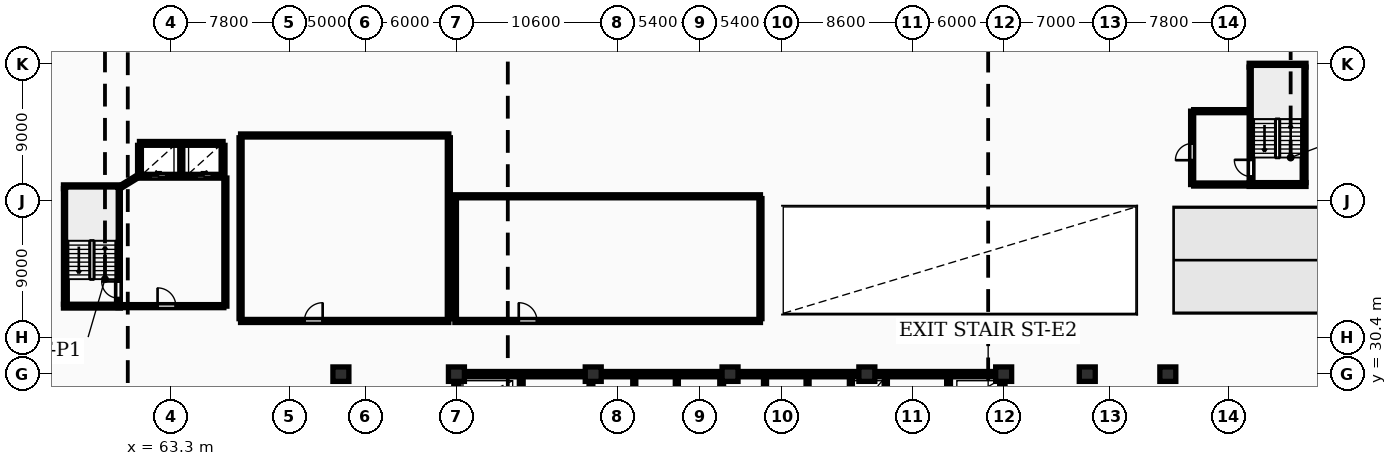
"""IFC4 building model, lengths in metres.
Left out: names, types, materials, properties, quantities, classifications, styles, units other than length and angle.
Written with IfcOpenShell. Run it as: python <this file> out.ifc"""

import sys

from ifc_helpers import new_model, si_unit, direction, frame, frame_2d, origin, origin_2d, place, context, subcontext, project, spatial, rectangle, extrude, element, fill, save


model = new_model("IFC4")
c1 = context("Model", 3, precision=1e-05, world=origin(), true_north=direction((0.0, 1.0)))
c2 = subcontext(c1, "Body", "Model", "MODEL_VIEW")
j1 = project(units=[si_unit("LENGTHUNIT", "METRE"), si_unit("PLANEANGLEUNIT", "RADIAN")], contexts=[c1])
p1 = place(None, origin())
s1 = spatial("IfcSite", under=j1, at=p1, CompositionType="ELEMENT")
p2 = place(p1, origin())
s2 = spatial("IfcBuilding", under=s1, at=p2, CompositionType="ELEMENT")
p3 = place(p2, frame((0.0, 0.0, -3.6)))
s3 = spatial("IfcBuildingStorey", under=s2, at=p3, CompositionType="ELEMENT", Elevation=-3.6)
for number, where, z_axis, x_axis in (
    (1, (74.5, 30.4, 0.0), (0.0, 0.0, 1.0), (1.0, 0.0, 0.0)),
    (2, (82.1, 30.4, 0.0), (0.0, 0.0, 1.0), (1.0, 0.0, 0.0)),
    (3, (91.1, 30.4, 0.0), (0.0, 0.0, 1.0), (1.0, 0.0, 0.0)),
    (4, (100.1, 30.4, 0.0), (0.0, 0.0, 1.0), (1.0, 0.0, 0.0)),
    (5, (109.1, 30.4, 0.0), (0.0, 0.0, 1.0), (1.0, 0.0, 0.0)),
    (6, (118.1, 30.4, 0.0), (0.0, 0.0, 1.0), (1.0, 0.0, 0.0)),
    (7, (123.6, 30.4, 0.0), (0.0, 0.0, 1.0), (1.0, 0.0, 0.0)),
    (8, (128.9, 30.4, 0.0), (0.0, 0.0, 1.0), (1.0, 0.0, 0.0)),
):
    element("IfcColumn", number, at=place(p3, frame(where, z_axis=z_axis, x_axis=x_axis)), inside=s3, PredefinedType="COLUMN", context=c2, shape_type="SweptSolid", body=[
        extrude(rectangle(XDim=1.05, YDim=0.95, at=origin_2d()), origin(), (0.0, 0.0, 1.0), 3.6),
    ])
p4 = place(p3, frame((81.925, 30.4, 0.0), z_axis=(0.0, 0.0, 1.0), x_axis=(1.0, 0.0, 0.0)))
e9 = element("IfcWall", 9, at=p4, inside=s3, PredefinedType="SHEAR", context=c2, shape_type="SweptSolid", body=[
    extrude(rectangle(XDim=36.265, YDim=0.35, at=frame_2d((18.132, 0.0))), origin(), (0.0, 0.0, 1.0), 3.6),
])
for number, where, z_axis, x_axis in (
    (10, (82.1, 18.575, 0.0), (0.0, 0.0, 1.0), (0.0, 1.0, 0.0)),
    (11, (118.015, 18.575, 0.0), (0.0, 0.0, 1.0), (0.0, 1.0, 0.0)),
):
    element("IfcWall", number, at=place(p3, frame(where, z_axis=z_axis, x_axis=x_axis)), inside=s3, PredefinedType="SHEAR", context=c2, shape_type="SweptSolid", body=[
        extrude(rectangle(XDim=11.65, YDim=0.35, at=frame_2d((5.825, 0.0))), origin(), (0.0, 0.0, 1.0), 3.6),
    ])
p5 = place(p3, frame((86.365, 18.6, 0.0), z_axis=(0.0, 0.0, 1.0), x_axis=(0.0, 1.0, 0.0)))
e12 = element("IfcWall", 12, at=p5, inside=s3, PredefinedType="SHEAR", context=c2, shape_type="SweptSolid", body=[
    extrude(rectangle(XDim=11.6, YDim=0.25, at=frame_2d((5.8, 0.0))), origin(), (0.0, 0.0, 1.0), 3.6),
])
p6 = place(p5, frame((0.45, 0.0, 0.0)))
e13 = element("IfcOpeningElement", 13, at=p6, cuts=e12, PredefinedType="OPENING", context=c2, shape_type="SweptSolid", body=[
    extrude(rectangle(XDim=0.85, YDim=2.05, at=frame_2d((0.425, 1.025))), frame((0.0, 0.135, 0.0), z_axis=(0.0, -1.0, 0.0), x_axis=(1.0, 0.0, 0.0)), (0.0, 0.0, 1.0), 0.27),
])
p7 = place(p5, frame((2.05, 0.0, 0.0)))
e14 = element("IfcOpeningElement", 14, at=p7, cuts=e12, PredefinedType="OPENING", context=c2, shape_type="SweptSolid", body=[
    extrude(rectangle(XDim=1.1, YDim=2.1, at=frame_2d((0.55, 1.05))), frame((0.0, 0.135, 0.0), z_axis=(0.0, -1.0, 0.0), x_axis=(1.0, 0.0, 0.0)), (0.0, 0.0, 1.0), 0.27),
])
p8 = place(p5, frame((9.95, 0.0, 0.0)))
e15 = element("IfcOpeningElement", 15, at=p8, cuts=e12, PredefinedType="OPENING", context=c2, shape_type="SweptSolid", body=[
    extrude(rectangle(XDim=0.85, YDim=2.05, at=frame_2d((0.425, 1.025))), frame((0.0, 0.135, 0.0), z_axis=(0.0, -1.0, 0.0), x_axis=(1.0, 0.0, 0.0)), (0.0, 0.0, 1.0), 0.27),
])
p9 = place(p3, frame((90.95, 18.6, 0.0), z_axis=(0.0, 0.0, 1.0), x_axis=(0.0, 1.0, 0.0)))
e16 = element("IfcWall", 16, at=p9, inside=s3, PredefinedType="SHEAR", context=c2, shape_type="SweptSolid", body=[
    extrude(rectangle(XDim=11.6, YDim=0.25, at=frame_2d((5.8, 0.0))), origin(), (0.0, 0.0, 1.0), 3.6),
])
p10 = place(p9, frame((4.6, 0.0, 0.0)))
e17 = element("IfcOpeningElement", 17, at=p10, cuts=e16, PredefinedType="OPENING", context=c2, shape_type="SweptSolid", body=[
    extrude(rectangle(XDim=1.1, YDim=2.1, at=frame_2d((0.55, 1.05))), frame((0.0, 0.135, 0.0), z_axis=(0.0, -1.0, 0.0), x_axis=(1.0, 0.0, 0.0)), (0.0, 0.0, 1.0), 0.27),
])
for number, where, z_axis, x_axis in (
    (18, (93.8, 27.38, 0.0), (0.0, 0.0, 1.0), (0.0, 1.0, 0.0)),
    (19, (96.6, 27.38, 0.0), (0.0, 0.0, 1.0), (0.0, 1.0, 0.0)),
):
    element("IfcWall", number, at=place(p3, frame(where, z_axis=z_axis, x_axis=x_axis)), inside=s3, PredefinedType="PARTITIONING", context=c2, shape_type="SweptSolid", body=[
        extrude(rectangle(XDim=2.82, YDim=0.2, at=frame_2d((1.41, 0.0))), origin(), (0.0, 0.0, 1.0), 3.3),
    ])
p11 = place(p3, frame((99.55, 27.25, 0.0), z_axis=(0.0, 0.0, 1.0), x_axis=(0.0, 1.0, 0.0)))
e20 = element("IfcWall", 20, at=p11, inside=s3, PredefinedType="SHEAR", context=c2, shape_type="SweptSolid", body=[
    extrude(rectangle(XDim=2.95, YDim=0.25, at=frame_2d((1.475, 0.0))), origin(), (0.0, 0.0, 1.0), 3.6),
])
for number, where, z_axis, x_axis in (
    (21, (102.4, 27.38, 0.0), (0.0, 0.0, 1.0), (0.0, 1.0, 0.0)),
    (22, (105.2, 27.38, 0.0), (0.0, 0.0, 1.0), (0.0, 1.0, 0.0)),
    (23, (108.05, 27.38, 0.0), (0.0, 0.0, 1.0), (0.0, 1.0, 0.0)),
):
    element("IfcWall", number, at=place(p3, frame(where, z_axis=z_axis, x_axis=x_axis)), inside=s3, PredefinedType="PARTITIONING", context=c2, shape_type="SweptSolid", body=[
        extrude(rectangle(XDim=2.82, YDim=0.2, at=frame_2d((1.41, 0.0))), origin(), (0.0, 0.0, 1.0), 3.3),
    ])
p12 = place(p3, frame((110.35, 18.6, 0.0), z_axis=(0.0, 0.0, 1.0), x_axis=(0.0, 1.0, 0.0)))
e24 = element("IfcWall", 24, at=p12, inside=s3, PredefinedType="PARTITIONING", context=c2, shape_type="SweptSolid", body=[
    extrude(rectangle(XDim=11.6, YDim=0.2, at=frame_2d((5.8, 0.0))), origin(), (0.0, 0.0, 1.0), 3.3),
])
p13 = place(p12, frame((5.2, 0.0, 0.0)))
e25 = element("IfcOpeningElement", 25, at=p13, cuts=e24, PredefinedType="OPENING", context=c2, shape_type="SweptSolid", body=[
    extrude(rectangle(XDim=1.1, YDim=2.15, at=frame_2d((0.55, 1.075))), frame((0.0, 0.11, 0.0), z_axis=(0.0, -1.0, 0.0), x_axis=(1.0, 0.0, 0.0)), (0.0, 0.0, 1.0), 0.22),
])
p14 = place(p3, frame((114.475, 18.6, 0.0), z_axis=(0.0, 0.0, 1.0), x_axis=(0.0, 1.0, 0.0)))
e26 = element("IfcWall", 26, at=p14, inside=s3, PredefinedType="SHEAR", context=c2, shape_type="SweptSolid", body=[
    extrude(rectangle(XDim=11.6, YDim=0.25, at=frame_2d((5.8, 0.0))), origin(), (0.0, 0.0, 1.0), 3.6),
])
p15 = place(p14, frame((0.45, 0.0, 0.0)))
e27 = element("IfcOpeningElement", 27, at=p15, cuts=e26, PredefinedType="OPENING", context=c2, shape_type="SweptSolid", body=[
    extrude(rectangle(XDim=0.85, YDim=2.05, at=frame_2d((0.425, 1.025))), frame((0.0, 0.135, 0.0), z_axis=(0.0, -1.0, 0.0), x_axis=(1.0, 0.0, 0.0)), (0.0, 0.0, 1.0), 0.27),
])
p16 = place(p14, frame((2.05, 0.0, 0.0)))
e28 = element("IfcOpeningElement", 28, at=p16, cuts=e26, PredefinedType="OPENING", context=c2, shape_type="SweptSolid", body=[
    extrude(rectangle(XDim=1.1, YDim=2.1, at=frame_2d((0.55, 1.05))), frame((0.0, 0.135, 0.0), z_axis=(0.0, -1.0, 0.0), x_axis=(1.0, 0.0, 0.0)), (0.0, 0.0, 1.0), 0.27),
])
p17 = place(p14, frame((9.95, 0.0, 0.0)))
e29 = element("IfcOpeningElement", 29, at=p17, cuts=e26, PredefinedType="OPENING", context=c2, shape_type="SweptSolid", body=[
    extrude(rectangle(XDim=0.85, YDim=2.05, at=frame_2d((0.425, 1.025))), frame((0.0, 0.135, 0.0), z_axis=(0.0, -1.0, 0.0), x_axis=(1.0, 0.0, 0.0)), (0.0, 0.0, 1.0), 0.27),
])
p18 = place(p3, frame((56.375, 35.0, 0.0), z_axis=(0.0, 0.0, 1.0), x_axis=(0.0, 1.0, 0.0)))
e30 = element("IfcWall", 30, at=p18, inside=s3, PredefinedType="SHEAR", context=c2, shape_type="SweptSolid", body=[
    extrude(rectangle(XDim=7.6, YDim=0.25, at=frame_2d((3.8, 0.0))), origin(), (0.0, 0.0, 1.0), 3.6),
])
for number, where, z_axis, x_axis in (
    (31, (56.25, 42.725, 0.0), (0.0, 0.0, 1.0), (1.0, 0.0, 0.0)),
    (32, (56.25, 34.875, 0.0), (0.0, 0.0, 1.0), (1.0, 0.0, 0.0)),
):
    element("IfcWall", number, at=place(p3, frame(where, z_axis=z_axis, x_axis=x_axis)), inside=s3, PredefinedType="SHEAR", context=c2, shape_type="SweptSolid", body=[
        extrude(rectangle(XDim=3.74, YDim=0.25, at=frame_2d((1.87, 0.0))), origin(), (0.0, 0.0, 1.0), 3.6),
    ])
p19 = place(p3, frame((59.865, 35.0, 0.0), z_axis=(0.0, 0.0, 1.0), x_axis=(0.0, 1.0, 0.0)))
e33 = element("IfcWall", 33, at=p19, inside=s3, PredefinedType="SHEAR", context=c2, shape_type="SweptSolid", body=[
    extrude(rectangle(XDim=7.6, YDim=0.25, at=frame_2d((3.8, 0.0))), origin(), (0.0, 0.0, 1.0), 3.6),
])
p20 = place(p19, frame((0.4, 0.0, 0.0)))
e34 = element("IfcOpeningElement", 34, at=p20, cuts=e33, PredefinedType="OPENING", context=c2, shape_type="SweptSolid", body=[
    extrude(rectangle(XDim=1.1, YDim=2.1, at=frame_2d((0.55, 1.05))), frame((0.0, 0.135, 0.0), z_axis=(0.0, -1.0, 0.0), x_axis=(1.0, 0.0, 0.0)), (0.0, 0.0, 1.0), 0.27),
])
p21 = place(p3, frame((61.25, 43.42, 0.0), z_axis=(0.0, 0.0, 1.0), x_axis=(1.0, 0.0, 0.0)))
e35 = element("IfcWall", 35, at=p21, inside=s3, PredefinedType="SHEAR", context=c2, shape_type="SweptSolid", body=[
    extrude(rectangle(XDim=5.5, YDim=0.25, at=frame_2d((2.75, 0.0))), origin(), (0.0, 0.0, 1.0), 3.6),
])
p22 = place(p21, frame((0.74, 0.0, 0.0)))
e36 = element("IfcOpeningElement", 36, at=p22, cuts=e35, PredefinedType="OPENING", context=c2, shape_type="SweptSolid", body=[
    extrude(rectangle(XDim=1.02, YDim=2.12, at=frame_2d((0.51, 1.06))), frame((0.0, 0.135, 0.0), z_axis=(0.0, -1.0, 0.0), x_axis=(1.0, 0.0, 0.0)), (0.0, 0.0, 1.0), 0.27),
])
p23 = place(p21, frame((3.74, 0.0, 0.0)))
e37 = element("IfcOpeningElement", 37, at=p23, cuts=e35, PredefinedType="OPENING", context=c2, shape_type="SweptSolid", body=[
    extrude(rectangle(XDim=1.02, YDim=2.12, at=frame_2d((0.51, 1.06))), frame((0.0, 0.135, 0.0), z_axis=(0.0, -1.0, 0.0), x_axis=(1.0, 0.0, 0.0)), (0.0, 0.0, 1.0), 0.27),
])
p24 = place(p3, frame((61.25, 45.58, 0.0), z_axis=(0.0, 0.0, 1.0), x_axis=(1.0, 0.0, 0.0)))
e38 = element("IfcWall", 38, at=p24, inside=s3, PredefinedType="SHEAR", context=c2, shape_type="SweptSolid", body=[
    extrude(rectangle(XDim=5.5, YDim=0.25, at=frame_2d((2.75, 0.0))), origin(), (0.0, 0.0, 1.0), 3.6),
])
for number, where, z_axis, x_axis in (
    (39, (61.25, 43.55, 0.0), (0.0, 0.0, 1.0), (0.0, 1.0, 0.0)),
    (40, (66.75, 43.55, 0.0), (0.0, 0.0, 1.0), (0.0, 1.0, 0.0)),
):
    element("IfcWall", number, at=place(p3, frame(where, z_axis=z_axis, x_axis=x_axis)), inside=s3, PredefinedType="SHEAR", context=c2, shape_type="SweptSolid", body=[
        extrude(rectangle(XDim=1.9, YDim=0.25, at=frame_2d((0.95, 0.0))), origin(), (0.0, 0.0, 1.0), 3.6),
    ])
p25 = place(p3, frame((64.0, 43.55, 0.0), z_axis=(0.0, 0.0, 1.0), x_axis=(0.0, 1.0, 0.0)))
e41 = element("IfcWall", 41, at=p25, inside=s3, PredefinedType="PARTITIONING", context=c2, shape_type="SweptSolid", body=[
    extrude(rectangle(XDim=1.9, YDim=0.2, at=frame_2d((0.95, 0.0))), origin(), (0.0, 0.0, 1.0), 3.3),
])
p26 = place(p3, frame((59.84, 34.875, 0.0), z_axis=(0.0, 0.0, 1.0), x_axis=(1.0, 0.0, 0.0)))
e42 = element("IfcWall", 42, at=p26, inside=s3, PredefinedType="PARTITIONING", context=c2, shape_type="SweptSolid", body=[
    extrude(rectangle(XDim=6.96, YDim=0.2, at=frame_2d((3.48, 0.0))), origin(), (0.0, 0.0, 1.0), 3.3),
])
p27 = place(p26, frame((2.6, 0.0, 0.0)))
e43 = element("IfcOpeningElement", 43, at=p27, cuts=e42, PredefinedType="OPENING", context=c2, shape_type="SweptSolid", body=[
    extrude(rectangle(XDim=1.2, YDim=2.18, at=frame_2d((0.6, 1.09))), frame((0.0, 0.11, 0.0), z_axis=(0.0, -1.0, 0.0), x_axis=(1.0, 0.0, 0.0)), (0.0, 0.0, 1.0), 0.22),
])
p28 = place(p3, frame((66.9, 34.875, 0.0), z_axis=(0.0, 0.0, 1.0), x_axis=(0.0, 1.0, 0.0)))
e44 = element("IfcWall", 44, at=p28, inside=s3, PredefinedType="PARTITIONING", context=c2, shape_type="SweptSolid", body=[
    extrude(rectangle(XDim=8.425, YDim=0.2, at=frame_2d((4.212, 0.0))), origin(), (0.0, 0.0, 1.0), 3.3),
])
p29 = place(p3, frame((60.02, 42.725, 0.0), z_axis=(0.0, 0.0, 1.0), x_axis=(0.851822584555, 0.523830396638, 0.0)))
e45 = element("IfcWall", 45, at=p29, inside=s3, PredefinedType="PARTITIONING", context=c2, shape_type="SweptSolid", body=[
    extrude(rectangle(XDim=1.326, YDim=0.2, at=frame_2d((0.663, 0.0))), origin(), (0.0, 0.0, 1.0), 3.3),
])
p30 = place(p3, frame((134.375, 43.0, 0.0), z_axis=(0.0, 0.0, 1.0), x_axis=(0.0, 1.0, 0.0)))
e46 = element("IfcWall", 46, at=p30, inside=s3, PredefinedType="SHEAR", context=c2, shape_type="SweptSolid", body=[
    extrude(rectangle(XDim=7.6, YDim=0.25, at=frame_2d((3.8, 0.0))), origin(), (0.0, 0.0, 1.0), 3.6),
])
p31 = place(p30, frame((0.4, 0.0, 0.0)))
e47 = element("IfcOpeningElement", 47, at=p31, cuts=e46, PredefinedType="OPENING", context=c2, shape_type="SweptSolid", body=[
    extrude(rectangle(XDim=1.1, YDim=2.1, at=frame_2d((0.55, 1.05))), frame((0.0, 0.135, 0.0), z_axis=(0.0, -1.0, 0.0), x_axis=(1.0, 0.0, 0.0)), (0.0, 0.0, 1.0), 0.27),
])
p32 = place(p3, frame((137.865, 43.0, 0.0), z_axis=(0.0, 0.0, 1.0), x_axis=(0.0, 1.0, 0.0)))
e48 = element("IfcWall", 48, at=p32, inside=s3, PredefinedType="SHEAR", context=c2, shape_type="SweptSolid", body=[
    extrude(rectangle(XDim=7.6, YDim=0.25, at=frame_2d((3.8, 0.0))), origin(), (0.0, 0.0, 1.0), 3.6),
])
for number, where, z_axis, x_axis in (
    (49, (134.25, 42.875, 0.0), (0.0, 0.0, 1.0), (1.0, 0.0, 0.0)),
    (50, (134.25, 50.725, 0.0), (0.0, 0.0, 1.0), (1.0, 0.0, 0.0)),
):
    element("IfcWall", number, at=place(p3, frame(where, z_axis=z_axis, x_axis=x_axis)), inside=s3, PredefinedType="SHEAR", context=c2, shape_type="SweptSolid", body=[
        extrude(rectangle(XDim=3.74, YDim=0.25, at=frame_2d((1.87, 0.0))), origin(), (0.0, 0.0, 1.0), 3.6),
    ])
p33 = place(p3, frame((130.5, 42.875, 0.0), z_axis=(0.0, 0.0, 1.0), x_axis=(0.0, 1.0, 0.0)))
e51 = element("IfcWall", 51, at=p33, inside=s3, PredefinedType="PARTITIONING", context=c2, shape_type="SweptSolid", body=[
    extrude(rectangle(XDim=4.825, YDim=0.2, at=frame_2d((2.413, 0.0))), origin(), (0.0, 0.0, 1.0), 3.3),
])
p34 = place(p33, frame((1.6, 0.0, 0.0)))
e52 = element("IfcOpeningElement", 52, at=p34, cuts=e51, PredefinedType="OPENING", context=c2, shape_type="SweptSolid", body=[
    extrude(rectangle(XDim=1.1, YDim=2.15, at=frame_2d((0.55, 1.075))), frame((0.0, 0.11, 0.0), z_axis=(0.0, -1.0, 0.0), x_axis=(1.0, 0.0, 0.0)), (0.0, 0.0, 1.0), 0.22),
])
for number, where, z_axis, x_axis in (
    (53, (130.6, 42.875, 0.0), (0.0, 0.0, 1.0), (1.0, 0.0, 0.0)),
    (54, (130.6, 47.7, 0.0), (0.0, 0.0, 1.0), (1.0, 0.0, 0.0)),
):
    element("IfcWall", number, at=place(p3, frame(where, z_axis=z_axis, x_axis=x_axis)), inside=s3, PredefinedType="PARTITIONING", context=c2, shape_type="SweptSolid", body=[
        extrude(rectangle(XDim=3.65, YDim=0.2, at=frame_2d((1.825, 0.0))), origin(), (0.0, 0.0, 1.0), 3.3),
    ])
p35 = place(p3, frame((67.9, 33.9, 0.0), z_axis=(0.0, 0.0, 1.0), x_axis=(1.0, 0.0, 0.0)))
e55 = element("IfcWall", 55, at=p35, inside=s3, PredefinedType="PARTITIONING", context=c2, shape_type="SweptSolid", body=[
    extrude(rectangle(XDim=13.7, YDim=0.2, at=frame_2d((6.85, 0.0))), origin(), (0.0, 0.0, 1.0), 3.3),
])
p36 = place(p35, frame((4.2, 0.0, 0.0)))
e56 = element("IfcOpeningElement", 56, at=p36, cuts=e55, PredefinedType="OPENING", context=c2, shape_type="SweptSolid", body=[
    extrude(rectangle(XDim=1.2, YDim=2.15, at=frame_2d((0.6, 1.075))), frame((0.0, 0.11, 0.0), z_axis=(0.0, -1.0, 0.0), x_axis=(1.0, 0.0, 0.0)), (0.0, 0.0, 1.0), 0.22),
])
p37 = place(p3, frame((67.9, 46.1, 0.0), z_axis=(0.0, 0.0, 1.0), x_axis=(1.0, 0.0, 0.0)))
e57 = element("IfcWall", 57, at=p37, inside=s3, PredefinedType="PARTITIONING", context=c2, shape_type="SweptSolid", body=[
    extrude(rectangle(XDim=13.7, YDim=0.2, at=frame_2d((6.85, 0.0))), origin(), (0.0, 0.0, 1.0), 3.3),
])
for number, where, z_axis, x_axis in (
    (58, (67.9, 34.05, 0.0), (0.0, 0.0, 1.0), (0.0, 1.0, 0.0)),
    (59, (81.6, 34.05, 0.0), (0.0, 0.0, 1.0), (0.0, 1.0, 0.0)),
):
    element("IfcWall", number, at=place(p3, frame(where, z_axis=z_axis, x_axis=x_axis)), inside=s3, PredefinedType="PARTITIONING", context=c2, shape_type="SweptSolid", body=[
        extrude(rectangle(XDim=11.9, YDim=0.2, at=frame_2d((5.95, 0.0))), origin(), (0.0, 0.0, 1.0), 3.3),
    ])
p38 = place(p3, frame((82.0, 33.9, 0.0), z_axis=(0.0, 0.0, 1.0), x_axis=(1.0, 0.0, 0.0)))
e60 = element("IfcWall", 60, at=p38, inside=s3, PredefinedType="PARTITIONING", context=c2, shape_type="SweptSolid", body=[
    extrude(rectangle(XDim=20.1, YDim=0.2, at=frame_2d((10.05, 0.0))), origin(), (0.0, 0.0, 1.0), 3.3),
])
p39 = place(p38, frame((4.2, 0.0, 0.0)))
e61 = element("IfcOpeningElement", 61, at=p39, cuts=e60, PredefinedType="OPENING", context=c2, shape_type="SweptSolid", body=[
    extrude(rectangle(XDim=1.2, YDim=2.15, at=frame_2d((0.6, 1.075))), frame((0.0, 0.11, 0.0), z_axis=(0.0, -1.0, 0.0), x_axis=(1.0, 0.0, 0.0)), (0.0, 0.0, 1.0), 0.22),
])
p40 = place(p3, frame((82.0, 42.1, 0.0), z_axis=(0.0, 0.0, 1.0), x_axis=(1.0, 0.0, 0.0)))
e62 = element("IfcWall", 62, at=p40, inside=s3, PredefinedType="PARTITIONING", context=c2, shape_type="SweptSolid", body=[
    extrude(rectangle(XDim=20.1, YDim=0.2, at=frame_2d((10.05, 0.0))), origin(), (0.0, 0.0, 1.0), 3.3),
])
for number, where, z_axis, x_axis in (
    (63, (82.0, 34.05, 0.0), (0.0, 0.0, 1.0), (0.0, 1.0, 0.0)),
    (64, (102.1, 34.05, 0.0), (0.0, 0.0, 1.0), (0.0, 1.0, 0.0)),
):
    element("IfcWall", number, at=place(p3, frame(where, z_axis=z_axis, x_axis=x_axis)), inside=s3, PredefinedType="PARTITIONING", context=c2, shape_type="SweptSolid", body=[
        extrude(rectangle(XDim=7.9, YDim=0.2, at=frame_2d((3.95, 0.0))), origin(), (0.0, 0.0, 1.0), 3.3),
    ])
p41 = place(p20, origin())
e65 = element("IfcDoor", 65, at=p41, inside=s3, OperationType="SINGLE_SWING_RIGHT", PredefinedType="DOOR", context=c2, shape_type="SweptSolid", body=[
    extrude(rectangle(XDim=1.1, YDim=2.1, at=frame_2d((0.55, 1.05))), frame((0.0, 0.025, 0.0), z_axis=(0.0, -1.0, 0.0), x_axis=(1.0, 0.0, 0.0)), (0.0, 0.0, 1.0), 0.05),
])
fill(e34, e65)
p42 = place(p22, origin())
e66 = element("IfcDoor", 66, at=p42, inside=s3, OperationType="SLIDING_TO_LEFT", PredefinedType="DOOR", context=c2, shape_type="SweptSolid", body=[
    extrude(rectangle(XDim=1.02, YDim=2.12, at=frame_2d((0.51, 1.06))), frame((0.0, 0.025, 0.0), z_axis=(0.0, -1.0, 0.0), x_axis=(1.0, 0.0, 0.0)), (0.0, 0.0, 1.0), 0.05),
])
fill(e36, e66)
p43 = place(p23, origin())
e67 = element("IfcDoor", 67, at=p43, inside=s3, OperationType="SLIDING_TO_RIGHT", PredefinedType="DOOR", context=c2, shape_type="SweptSolid", body=[
    extrude(rectangle(XDim=1.02, YDim=2.12, at=frame_2d((0.51, 1.06))), frame((0.0, 0.025, 0.0), z_axis=(0.0, -1.0, 0.0), x_axis=(1.0, 0.0, 0.0)), (0.0, 0.0, 1.0), 0.05),
])
fill(e37, e67)
p44 = place(p27, origin())
e68 = element("IfcDoor", 68, at=p44, inside=s3, OperationType="SINGLE_SWING_LEFT", PredefinedType="DOOR", context=c2, shape_type="SweptSolid", body=[
    extrude(rectangle(XDim=1.2, YDim=2.18, at=frame_2d((0.6, 1.09))), frame((0.0, 0.025, 0.0), z_axis=(0.0, -1.0, 0.0), x_axis=(1.0, 0.0, 0.0)), (0.0, 0.0, 1.0), 0.05),
])
fill(e43, e68)
p45 = place(p31, origin())
e69 = element("IfcDoor", 69, at=p45, inside=s3, OperationType="SINGLE_SWING_RIGHT", PredefinedType="DOOR", context=c2, shape_type="SweptSolid", body=[
    extrude(rectangle(XDim=1.1, YDim=2.1, at=frame_2d((0.55, 1.05))), frame((0.0, 0.025, 0.0), z_axis=(0.0, -1.0, 0.0), x_axis=(1.0, 0.0, 0.0)), (0.0, 0.0, 1.0), 0.05),
])
fill(e47, e69)
p46 = place(p34, origin())
e70 = element("IfcDoor", 70, at=p46, inside=s3, OperationType="SINGLE_SWING_LEFT", PredefinedType="DOOR", context=c2, shape_type="SweptSolid", body=[
    extrude(rectangle(XDim=1.1, YDim=2.15, at=frame_2d((0.55, 1.075))), frame((0.0, 0.025, 0.0), z_axis=(0.0, -1.0, 0.0), x_axis=(1.0, 0.0, 0.0)), (0.0, 0.0, 1.0), 0.05),
])
fill(e52, e70)
p47 = place(p36, origin())
e71 = element("IfcDoor", 71, at=p47, inside=s3, OperationType="SINGLE_SWING_RIGHT", PredefinedType="DOOR", context=c2, shape_type="SweptSolid", body=[
    extrude(rectangle(XDim=1.2, YDim=2.15, at=frame_2d((0.6, 1.075))), frame((0.0, 0.025, 0.0), z_axis=(0.0, -1.0, 0.0), x_axis=(1.0, 0.0, 0.0)), (0.0, 0.0, 1.0), 0.05),
])
fill(e56, e71)
p48 = place(p39, origin())
e72 = element("IfcDoor", 72, at=p48, inside=s3, OperationType="SINGLE_SWING_LEFT", PredefinedType="DOOR", context=c2, shape_type="SweptSolid", body=[
    extrude(rectangle(XDim=1.2, YDim=2.15, at=frame_2d((0.6, 1.075))), frame((0.0, 0.025, 0.0), z_axis=(0.0, -1.0, 0.0), x_axis=(1.0, 0.0, 0.0)), (0.0, 0.0, 1.0), 0.05),
])
fill(e61, e72)
save(model, sys.argv[1])
